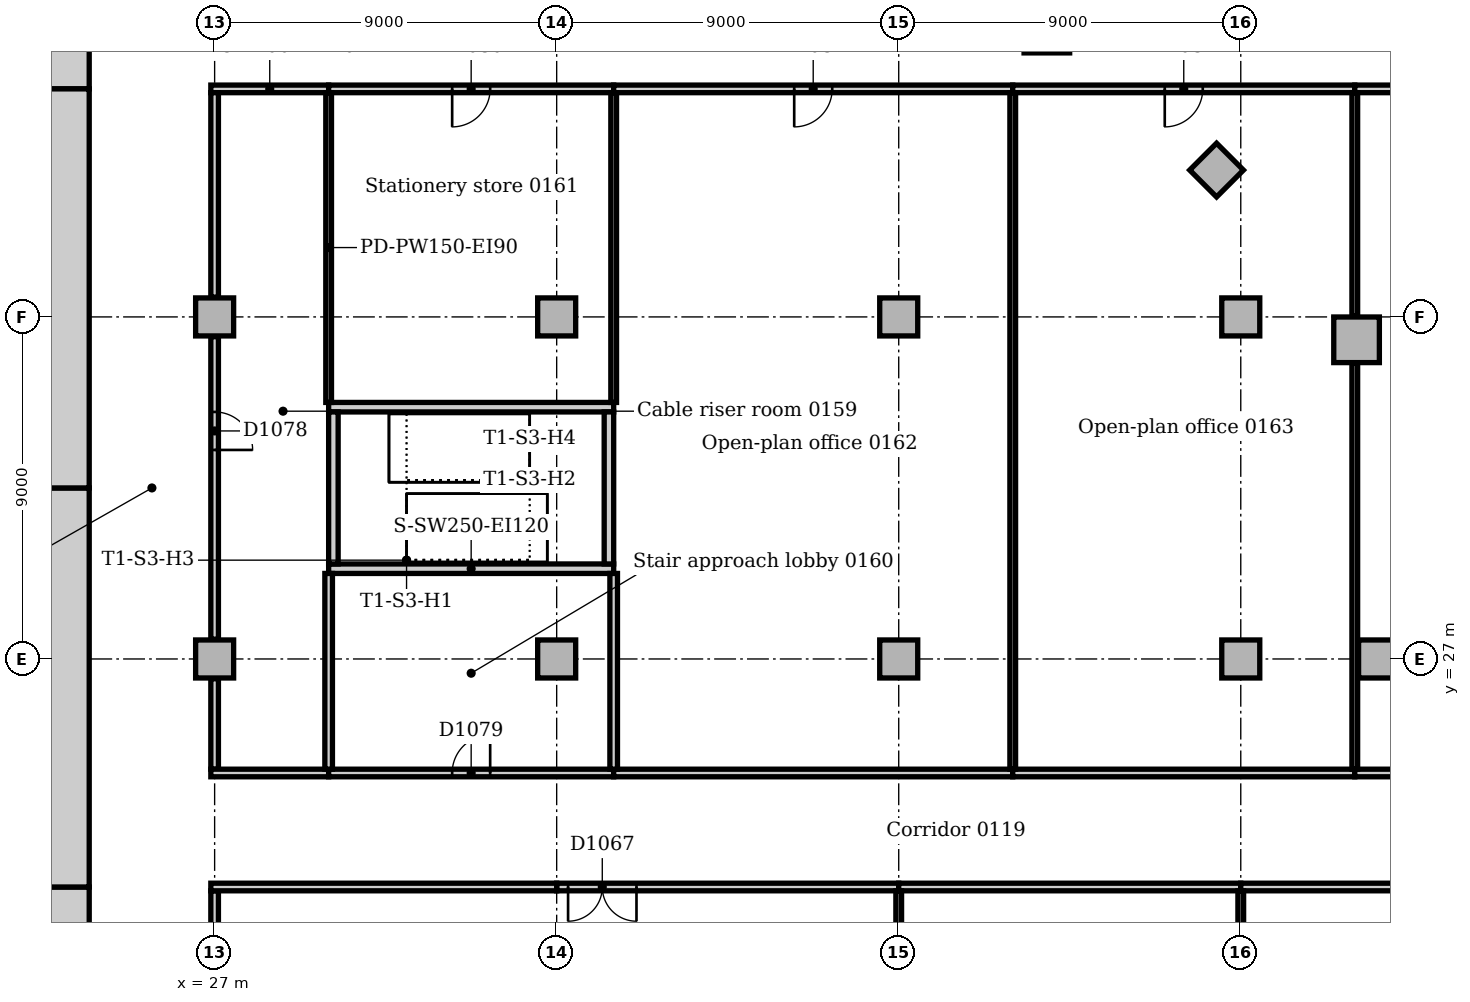
"""IFC4 building model, lengths in metres.
Left out: names, types, materials, properties, quantities, classifications, styles, units other than length and angle.
Written with IfcOpenShell. Run it as: python <this file> out.ifc"""

import sys

from ifc_helpers import new_model, si_unit, direction, frame, frame_2d, origin, origin_2d, place, context, subcontext, project, spatial, rectangle, extrude, element, fill, save


model = new_model("IFC4")
c1 = context("Model", 3, precision=1e-05, world=origin(), true_north=direction((0.0, 1.0)))
c2 = subcontext(c1, "Body", "Model", "MODEL_VIEW")
j1 = project(units=[si_unit("LENGTHUNIT", "METRE"), si_unit("PLANEANGLEUNIT", "RADIAN")], contexts=[c1])
p1 = place(None, origin())
s1 = spatial("IfcSite", under=j1, at=p1, CompositionType="ELEMENT")
p2 = place(p1, origin())
s2 = spatial("IfcBuilding", under=s1, at=p2, CompositionType="ELEMENT")
p3 = place(p2, frame((0.0, 0.0, 6.0)))
s3 = spatial("IfcBuildingStorey", under=s2, at=p3, CompositionType="ELEMENT", Elevation=6.0)
for number, where, z_axis, x_axis in (
    (1, (3.9, 20.4, 0.0), (0.0, 0.0, 1.0), (1.0, 0.0, 0.0)),
    (2, (23.7, 42.6, 0.0), (0.0, 0.0, 1.0), (-1.0, 0.0, 0.0)),
):
    element("IfcWall", number, at=place(p3, frame(where, z_axis=z_axis, x_axis=x_axis)), inside=s3, PredefinedType="SOLIDWALL", context=c2, shape_type="SweptSolid", body=[
        extrude(rectangle(XDim=19.8, YDim=1.2, at=frame_2d((9.9, 0.0))), origin(), (0.0, 0.0, 1.0), 5.0),
    ])
p4 = place(p3, frame((23.1, 21.0, 0.0), z_axis=(0.0, 0.0, 1.0), x_axis=(0.0, 1.0, 0.0)))
e3 = element("IfcWall", 3, at=p4, inside=s3, PredefinedType="SOLIDWALL", context=c2, shape_type="SweptSolid", body=[
    extrude(rectangle(XDim=10.5, YDim=1.2, at=frame_2d((5.25, 0.0))), origin(), (0.0, 0.0, 1.0), 5.0),
])
p5 = place(p4, frame((4.35, 0.0, 0.0)))
e4 = element("IfcOpeningElement", 4, at=p5, cuts=e3, PredefinedType="OPENING", context=c2, shape_type="SweptSolid", body=[
    extrude(rectangle(XDim=1.8, YDim=2.1, at=frame_2d((0.9, 1.05))), frame((0.0, 0.61, 0.0), z_axis=(0.0, -1.0, 0.0), x_axis=(1.0, 0.0, 0.0)), (0.0, 0.0, 1.0), 1.22),
])
p6 = place(p3, frame((23.1, 31.5, 0.0), z_axis=(0.0, 0.0, 1.0), x_axis=(0.0, 1.0, 0.0)))
e5 = element("IfcWall", 5, at=p6, inside=s3, PredefinedType="SOLIDWALL", context=c2, shape_type="SweptSolid", body=[
    extrude(rectangle(XDim=10.5, YDim=1.2, at=frame_2d((5.25, 0.0))), origin(), (0.0, 0.0, 1.0), 5.0),
])
p7 = place(p6, frame((3.15, 0.0, 0.0)))
e6 = element("IfcOpeningElement", 6, at=p7, cuts=e5, PredefinedType="OPENING", context=c2, shape_type="SweptSolid", body=[
    extrude(rectangle(XDim=1.0, YDim=2.1, at=frame_2d((0.5, 1.05))), frame((0.0, 0.61, 0.0), z_axis=(0.0, -1.0, 0.0), x_axis=(1.0, 0.0, 0.0)), (0.0, 0.0, 1.0), 1.22),
])
p8 = place(p6, frame((5.2, 0.0, 0.0)))
e7 = element("IfcOpeningElement", 7, at=p8, cuts=e5, PredefinedType="OPENING", context=c2, shape_type="SweptSolid", body=[
    extrude(rectangle(XDim=1.0, YDim=2.1, at=frame_2d((0.5, 1.05))), frame((0.0, 0.61, 0.0), z_axis=(0.0, -1.0, 0.0), x_axis=(1.0, 0.0, 0.0)), (0.0, 0.0, 1.0), 1.22),
])
for number, where, z_axis, x_axis in (
    (8, (30.0, 29.375, 0.0), (0.0, 0.0, 1.0), (1.0, 0.0, 0.0)),
    (9, (37.5, 33.625, 0.0), (0.0, 0.0, 1.0), (-1.0, 0.0, 0.0)),
):
    element("IfcWall", number, at=place(p3, frame(where, z_axis=z_axis, x_axis=x_axis)), inside=s3, PredefinedType="SOLIDWALL", context=c2, shape_type="SweptSolid", body=[
        extrude(rectangle(XDim=7.5, YDim=0.25, at=frame_2d((3.75, 0.0))), origin(), (0.0, 0.0, 1.0), 5.0),
    ])
for number, where, z_axis, x_axis in (
    (10, (37.375, 29.5, 0.0), (0.0, 0.0, 1.0), (0.0, 1.0, 0.0)),
    (11, (30.125, 33.5, 0.0), (0.0, 0.0, 1.0), (0.0, -1.0, 0.0)),
):
    element("IfcWall", number, at=place(p3, frame(where, z_axis=z_axis, x_axis=x_axis)), inside=s3, PredefinedType="SOLIDWALL", context=c2, shape_type="SweptSolid", body=[
        extrude(rectangle(XDim=4.0, YDim=0.25, at=frame_2d((2.0, 0.0))), origin(), (0.0, 0.0, 1.0), 5.0),
    ])
for number, where, z_axis, x_axis in (
    (12, (57.047, 35.398, 0.0), (0.0, 0.0, 1.0), (1.0, 0.0, 0.0)),
    (13, (48.898, 43.547, 0.0), (0.0, 0.0, 1.0), (1.0, 0.0, 0.0)),
):
    element("IfcColumn", number, at=place(p3, frame(where, z_axis=z_axis, x_axis=x_axis)), inside=s3, PredefinedType="COLUMN", context=c2, shape_type="SweptSolid", body=[
        extrude(rectangle(XDim=1.2, YDim=1.2, at=origin_2d()), origin(), (0.0, 0.0, 1.0), 4.7),
    ])
for number, where, z_axis, x_axis in (
    (14, (57.6, 27.0, 0.0), (0.0, 0.0, 1.0), (1.0, 0.0, 0.0)),
    (15, (53.364, 39.864, 0.0), (0.0, 0.0, 1.0), (0.707, 0.707, 0.0)),
    (16, (27.0, 27.0, 0.0), (0.0, 0.0, 1.0), (1.0, 0.0, 0.0)),
    (17, (27.0, 36.0, 0.0), (0.0, 0.0, 1.0), (1.0, 0.0, 0.0)),
    (18, (36.0, 27.0, 0.0), (0.0, 0.0, 1.0), (1.0, 0.0, 0.0)),
    (19, (36.0, 36.0, 0.0), (0.0, 0.0, 1.0), (1.0, 0.0, 0.0)),
    (20, (45.0, 27.0, 0.0), (0.0, 0.0, 1.0), (1.0, 0.0, 0.0)),
    (21, (45.0, 36.0, 0.0), (0.0, 0.0, 1.0), (1.0, 0.0, 0.0)),
    (22, (54.0, 27.0, 0.0), (0.0, 0.0, 1.0), (1.0, 0.0, 0.0)),
    (23, (54.0, 36.0, 0.0), (0.0, 0.0, 1.0), (1.0, 0.0, 0.0)),
):
    element("IfcColumn", number, at=place(p3, frame(where, z_axis=z_axis, x_axis=x_axis)), inside=s3, PredefinedType="COLUMN", context=c2, shape_type="SweptSolid", body=[
        extrude(rectangle(XDim=1.0, YDim=1.0, at=origin_2d()), origin(), (0.0, 0.0, 1.0), 4.7),
    ])
p9 = place(p3, frame((26.9, 42.0, 0.0), z_axis=(0.0, 0.0, 1.0), x_axis=(1.0, 0.0, 0.0)))
e24 = element("IfcWall", 24, at=p9, inside=s3, PredefinedType="PARTITIONING", context=c2, shape_type="SweptSolid", body=[
    extrude(rectangle(XDim=3.1, YDim=0.2, at=frame_2d((1.55, 0.0))), origin(), (0.0, 0.0, 1.0), 4.7),
])
p10 = place(p3, frame((30.0, 42.0, 0.0), z_axis=(0.0, 0.0, 1.0), x_axis=(1.0, 0.0, 0.0)))
e25 = element("IfcWall", 25, at=p10, inside=s3, PredefinedType="PARTITIONING", context=c2, shape_type="SweptSolid", body=[
    extrude(rectangle(XDim=7.5, YDim=0.2, at=frame_2d((3.75, 0.0))), origin(), (0.0, 0.0, 1.0), 4.7),
])
p11 = place(p10, frame((3.25, 0.0, 0.0)))
e26 = element("IfcOpeningElement", 26, at=p11, cuts=e25, PredefinedType="OPENING", context=c2, shape_type="SweptSolid", body=[
    extrude(rectangle(XDim=1.0, YDim=2.1, at=frame_2d((0.5, 1.05))), frame((0.0, 0.11, 0.0), z_axis=(0.0, -1.0, 0.0), x_axis=(1.0, 0.0, 0.0)), (0.0, 0.0, 1.0), 0.22),
])
p12 = place(p3, frame((37.5, 42.0, 0.0), z_axis=(0.0, 0.0, 1.0), x_axis=(1.0, 0.0, 0.0)))
e27 = element("IfcWall", 27, at=p12, inside=s3, PredefinedType="PARTITIONING", context=c2, shape_type="SweptSolid", body=[
    extrude(rectangle(XDim=10.5, YDim=0.2, at=frame_2d((5.25, 0.0))), origin(), (0.0, 0.0, 1.0), 4.7),
])
p13 = place(p12, frame((4.75, 0.0, 0.0)))
e28 = element("IfcOpeningElement", 28, at=p13, cuts=e27, PredefinedType="OPENING", context=c2, shape_type="SweptSolid", body=[
    extrude(rectangle(XDim=1.0, YDim=2.1, at=frame_2d((0.5, 1.05))), frame((0.0, 0.11, 0.0), z_axis=(0.0, -1.0, 0.0), x_axis=(1.0, 0.0, 0.0)), (0.0, 0.0, 1.0), 0.22),
])
p14 = place(p3, frame((48.0, 42.0, 0.0), z_axis=(0.0, 0.0, 1.0), x_axis=(1.0, 0.0, 0.0)))
e29 = element("IfcWall", 29, at=p14, inside=s3, PredefinedType="PARTITIONING", context=c2, shape_type="SweptSolid", body=[
    extrude(rectangle(XDim=9.0, YDim=0.2, at=frame_2d((4.5, 0.0))), origin(), (0.0, 0.0, 1.0), 4.7),
])
p15 = place(p14, frame((4.0, 0.0, 0.0)))
e30 = element("IfcOpeningElement", 30, at=p15, cuts=e29, PredefinedType="OPENING", context=c2, shape_type="SweptSolid", body=[
    extrude(rectangle(XDim=1.0, YDim=2.1, at=frame_2d((0.5, 1.05))), frame((0.0, 0.11, 0.0), z_axis=(0.0, -1.0, 0.0), x_axis=(1.0, 0.0, 0.0)), (0.0, 0.0, 1.0), 0.22),
])
p16 = place(p3, frame((57.0, 42.0, 0.0), z_axis=(0.0, 0.0, 1.0), x_axis=(1.0, 0.0, 0.0)))
e31 = element("IfcWall", 31, at=p16, inside=s3, PredefinedType="PARTITIONING", context=c2, shape_type="SweptSolid", body=[
    extrude(rectangle(XDim=8.6, YDim=0.2, at=frame_2d((4.3, 0.0))), origin(), (0.0, 0.0, 1.0), 4.7),
])
p17 = place(p16, frame((4.0, 0.0, 0.0)))
e32 = element("IfcOpeningElement", 32, at=p17, cuts=e31, PredefinedType="OPENING", context=c2, shape_type="SweptSolid", body=[
    extrude(rectangle(XDim=1.0, YDim=2.1, at=frame_2d((0.5, 1.05))), frame((0.0, 0.11, 0.0), z_axis=(0.0, -1.0, 0.0), x_axis=(1.0, 0.0, 0.0)), (0.0, 0.0, 1.0), 0.22),
])
for number, where, z_axis, x_axis in (
    (33, (27.0, 18.52, 0.0), (0.0, 0.0, 1.0), (0.0, 1.0, 0.0)),
    (34, (27.0, 24.1, 0.0), (0.0, 0.0, 1.0), (0.0, 1.0, 0.0)),
):
    element("IfcWall", number, at=place(p3, frame(where, z_axis=z_axis, x_axis=x_axis)), inside=s3, PredefinedType="PARTITIONING", context=c2, shape_type="SweptSolid", body=[
        extrude(rectangle(XDim=2.38, YDim=0.2, at=frame_2d((1.19, 0.0))), origin(), (0.0, 0.0, 1.0), 4.7),
    ])
p18 = place(p3, frame((27.0, 27.52, 0.0), z_axis=(0.0, 0.0, 1.0), x_axis=(0.0, 1.0, 0.0)))
e35 = element("IfcWall", 35, at=p18, inside=s3, PredefinedType="PARTITIONING", context=c2, shape_type="SweptSolid", body=[
    extrude(rectangle(XDim=7.96, YDim=0.2, at=frame_2d((3.98, 0.0))), origin(), (0.0, 0.0, 1.0), 4.7),
])
p19 = place(p18, frame((4.98, 0.0, 0.0)))
e36 = element("IfcOpeningElement", 36, at=p19, cuts=e35, PredefinedType="OPENING", context=c2, shape_type="SweptSolid", body=[
    extrude(rectangle(XDim=1.0, YDim=2.1, at=frame_2d((0.5, 1.05))), frame((0.0, 0.11, 0.0), z_axis=(0.0, -1.0, 0.0), x_axis=(1.0, 0.0, 0.0)), (0.0, 0.0, 1.0), 0.22),
])
p20 = place(p3, frame((27.0, 36.52, 0.0), z_axis=(0.0, 0.0, 1.0), x_axis=(0.0, 1.0, 0.0)))
e37 = element("IfcWall", 37, at=p20, inside=s3, PredefinedType="PARTITIONING", context=c2, shape_type="SweptSolid", body=[
    extrude(rectangle(XDim=5.38, YDim=0.2, at=frame_2d((2.69, 0.0))), origin(), (0.0, 0.0, 1.0), 4.7),
])
p21 = place(p3, frame((36.0, 21.0, 0.0), z_axis=(0.0, 0.0, 1.0), x_axis=(1.0, 0.0, 0.0)))
e38 = element("IfcWall", 38, at=p21, inside=s3, PredefinedType="PARTITIONING", context=c2, shape_type="SweptSolid", body=[
    extrude(rectangle(XDim=9.0, YDim=0.2, at=frame_2d((4.5, 0.0))), origin(), (0.0, 0.0, 1.0), 4.7),
])
p22 = place(p21, frame((0.3, 0.0, 0.0)))
e39 = element("IfcOpeningElement", 39, at=p22, cuts=e38, PredefinedType="OPENING", context=c2, shape_type="SweptSolid", body=[
    extrude(rectangle(XDim=1.8, YDim=2.1, at=frame_2d((0.9, 1.05))), frame((0.0, 0.11, 0.0), z_axis=(0.0, -1.0, 0.0), x_axis=(1.0, 0.0, 0.0)), (0.0, 0.0, 1.0), 0.22),
])
p23 = place(p3, frame((26.9, 21.0, 0.0), z_axis=(0.0, 0.0, 1.0), x_axis=(1.0, 0.0, 0.0)))
e40 = element("IfcWall", 40, at=p23, inside=s3, PredefinedType="PARTITIONING", context=c2, shape_type="SweptSolid", body=[
    extrude(rectangle(XDim=9.1, YDim=0.2, at=frame_2d((4.55, 0.0))), origin(), (0.0, 0.0, 1.0), 4.7),
])
p24 = place(p3, frame((45.0, 21.0, 0.0), z_axis=(0.0, 0.0, 1.0), x_axis=(1.0, 0.0, 0.0)))
e41 = element("IfcWall", 41, at=p24, inside=s3, PredefinedType="PARTITIONING", context=c2, shape_type="SweptSolid", body=[
    extrude(rectangle(XDim=9.0, YDim=0.2, at=frame_2d((4.5, 0.0))), origin(), (0.0, 0.0, 1.0), 4.7),
])
p25 = place(p3, frame((54.0, 21.0, 0.0), z_axis=(0.0, 0.0, 1.0), x_axis=(1.0, 0.0, 0.0)))
e42 = element("IfcWall", 42, at=p25, inside=s3, PredefinedType="PARTITIONING", context=c2, shape_type="SweptSolid", body=[
    extrude(rectangle(XDim=11.6, YDim=0.2, at=frame_2d((5.8, 0.0))), origin(), (0.0, 0.0, 1.0), 4.7),
])
p26 = place(p3, frame((26.9, 24.0, 0.0), z_axis=(0.0, 0.0, 1.0), x_axis=(1.0, 0.0, 0.0)))
e43 = element("IfcWall", 43, at=p26, inside=s3, PredefinedType="PARTITIONING", context=c2, shape_type="SweptSolid", body=[
    extrude(rectangle(XDim=3.1, YDim=0.2, at=frame_2d((1.55, 0.0))), origin(), (0.0, 0.0, 1.0), 4.7),
])
p27 = place(p3, frame((30.0, 24.0, 0.0), z_axis=(0.0, 0.0, 1.0), x_axis=(1.0, 0.0, 0.0)))
e44 = element("IfcWall", 44, at=p27, inside=s3, PredefinedType="PARTITIONING", context=c2, shape_type="SweptSolid", body=[
    extrude(rectangle(XDim=7.5, YDim=0.2, at=frame_2d((3.75, 0.0))), origin(), (0.0, 0.0, 1.0), 4.7),
])
p28 = place(p27, frame((3.25, 0.0, 0.0)))
e45 = element("IfcOpeningElement", 45, at=p28, cuts=e44, PredefinedType="OPENING", context=c2, shape_type="SweptSolid", body=[
    extrude(rectangle(XDim=1.0, YDim=2.1, at=frame_2d((0.5, 1.05))), frame((0.0, 0.11, 0.0), z_axis=(0.0, -1.0, 0.0), x_axis=(1.0, 0.0, 0.0)), (0.0, 0.0, 1.0), 0.22),
])
p29 = place(p3, frame((37.5, 24.0, 0.0), z_axis=(0.0, 0.0, 1.0), x_axis=(1.0, 0.0, 0.0)))
e46 = element("IfcWall", 46, at=p29, inside=s3, PredefinedType="PARTITIONING", context=c2, shape_type="SweptSolid", body=[
    extrude(rectangle(XDim=10.5, YDim=0.2, at=frame_2d((5.25, 0.0))), origin(), (0.0, 0.0, 1.0), 4.7),
])
p30 = place(p3, frame((48.0, 24.0, 0.0), z_axis=(0.0, 0.0, 1.0), x_axis=(1.0, 0.0, 0.0)))
e47 = element("IfcWall", 47, at=p30, inside=s3, PredefinedType="PARTITIONING", context=c2, shape_type="SweptSolid", body=[
    extrude(rectangle(XDim=9.0, YDim=0.2, at=frame_2d((4.5, 0.0))), origin(), (0.0, 0.0, 1.0), 4.7),
])
p31 = place(p3, frame((57.0, 24.0, 0.0), z_axis=(0.0, 0.0, 1.0), x_axis=(1.0, 0.0, 0.0)))
e48 = element("IfcWall", 48, at=p31, inside=s3, PredefinedType="PARTITIONING", context=c2, shape_type="SweptSolid", body=[
    extrude(rectangle(XDim=8.6, YDim=0.2, at=frame_2d((4.3, 0.0))), origin(), (0.0, 0.0, 1.0), 4.7),
])
for number, where, z_axis, x_axis in (
    (49, (45.0, 18.52, 0.0), (0.0, 0.0, 1.0), (0.0, 1.0, 0.0)),
    (50, (54.0, 18.52, 0.0), (0.0, 0.0, 1.0), (0.0, 1.0, 0.0)),
):
    element("IfcWall", number, at=place(p3, frame(where, z_axis=z_axis, x_axis=x_axis)), inside=s3, PredefinedType="PARTITIONING", context=c2, shape_type="SweptSolid", body=[
        extrude(rectangle(XDim=2.38, YDim=0.15, at=frame_2d((1.19, 0.0))), origin(), (0.0, 0.0, 1.0), 4.7),
    ])
p32 = place(p3, frame((30.0, 24.1, 0.0), z_axis=(0.0, 0.0, 1.0), x_axis=(0.0, 1.0, 0.0)))
e51 = element("IfcWall", 51, at=p32, inside=s3, PredefinedType="PARTITIONING", context=c2, shape_type="SweptSolid", body=[
    extrude(rectangle(XDim=5.15, YDim=0.2, at=frame_2d((2.575, 0.0))), origin(), (0.0, 0.0, 1.0), 4.7),
])
p33 = place(p3, frame((30.0, 33.75, 0.0), z_axis=(0.0, 0.0, 1.0), x_axis=(0.0, 1.0, 0.0)))
e52 = element("IfcWall", 52, at=p33, inside=s3, PredefinedType="PARTITIONING", context=c2, shape_type="SweptSolid", body=[
    extrude(rectangle(XDim=8.15, YDim=0.15, at=frame_2d((4.075, 0.0))), origin(), (0.0, 0.0, 1.0), 4.7),
])
p34 = place(p3, frame((37.5, 24.1, 0.0), z_axis=(0.0, 0.0, 1.0), x_axis=(0.0, 1.0, 0.0)))
e53 = element("IfcWall", 53, at=p34, inside=s3, PredefinedType="PARTITIONING", context=c2, shape_type="SweptSolid", body=[
    extrude(rectangle(XDim=5.15, YDim=0.2, at=frame_2d((2.575, 0.0))), origin(), (0.0, 0.0, 1.0), 4.7),
])
p35 = place(p3, frame((37.5, 33.75, 0.0), z_axis=(0.0, 0.0, 1.0), x_axis=(0.0, 1.0, 0.0)))
e54 = element("IfcWall", 54, at=p35, inside=s3, PredefinedType="PARTITIONING", context=c2, shape_type="SweptSolid", body=[
    extrude(rectangle(XDim=8.15, YDim=0.15, at=frame_2d((4.075, 0.0))), origin(), (0.0, 0.0, 1.0), 4.7),
])
p36 = place(p3, frame((48.0, 24.1, 0.0), z_axis=(0.0, 0.0, 1.0), x_axis=(0.0, 1.0, 0.0)))
e55 = element("IfcWall", 55, at=p36, inside=s3, PredefinedType="PARTITIONING", context=c2, shape_type="SweptSolid", body=[
    extrude(rectangle(XDim=17.8, YDim=0.15, at=frame_2d((8.9, 0.0))), origin(), (0.0, 0.0, 1.0), 4.7),
])
p37 = place(p3, frame((57.0, 24.1, 0.0), z_axis=(0.0, 0.0, 1.0), x_axis=(0.0, 1.0, 0.0)))
e56 = element("IfcWall", 56, at=p37, inside=s3, PredefinedType="PARTITIONING", context=c2, shape_type="SweptSolid", body=[
    extrude(rectangle(XDim=10.678, YDim=0.15, at=frame_2d((5.339, 0.0))), origin(), (0.0, 0.0, 1.0), 4.7),
])
p38 = place(p3, frame((57.0, 36.018, 0.0), z_axis=(0.0, 0.0, 1.0), x_axis=(0.0, 1.0, 0.0)))
e57 = element("IfcWall", 57, at=p38, inside=s3, PredefinedType="PARTITIONING", context=c2, shape_type="SweptSolid", body=[
    extrude(rectangle(XDim=5.882, YDim=0.15, at=frame_2d((2.941, 0.0))), origin(), (0.0, 0.0, 1.0), 4.7),
])
p39 = place(p22, frame((1.8, 0.0, 0.0), z_axis=(0.0, 0.0, 1.0), x_axis=(-1.0, 0.0, 0.0)))
e58 = element("IfcDoor", 58, at=p39, inside=s3, OperationType="DOUBLE_DOOR_SINGLE_SWING", PredefinedType="DOOR", context=c2, shape_type="SweptSolid", body=[
    extrude(rectangle(XDim=1.8, YDim=2.1, at=frame_2d((0.9, 1.05))), frame((0.0, 0.025, 0.0), z_axis=(0.0, -1.0, 0.0), x_axis=(1.0, 0.0, 0.0)), (0.0, 0.0, 1.0), 0.05),
])
fill(e39, e58)
p40 = place(p19, frame((1.0, 0.0, 0.0), z_axis=(0.0, 0.0, 1.0), x_axis=(-1.0, 0.0, 0.0)))
e59 = element("IfcDoor", 59, at=p40, inside=s3, OperationType="SINGLE_SWING_RIGHT", PredefinedType="DOOR", context=c2, shape_type="SweptSolid", body=[
    extrude(rectangle(XDim=1.0, YDim=2.1, at=frame_2d((0.5, 1.05))), frame((0.0, 0.025, 0.0), z_axis=(0.0, -1.0, 0.0), x_axis=(1.0, 0.0, 0.0)), (0.0, 0.0, 1.0), 0.05),
])
fill(e36, e59)
p41 = place(p28, origin())
e60 = element("IfcDoor", 60, at=p41, inside=s3, OperationType="SINGLE_SWING_RIGHT", PredefinedType="DOOR", context=c2, shape_type="SweptSolid", body=[
    extrude(rectangle(XDim=1.0, YDim=2.1, at=frame_2d((0.5, 1.05))), frame((0.0, 0.025, 0.0), z_axis=(0.0, -1.0, 0.0), x_axis=(1.0, 0.0, 0.0)), (0.0, 0.0, 1.0), 0.05),
])
fill(e45, e60)
p42 = place(p11, frame((1.0, 0.0, 0.0), z_axis=(0.0, 0.0, 1.0), x_axis=(-1.0, 0.0, 0.0)))
e61 = element("IfcDoor", 61, at=p42, inside=s3, OperationType="SINGLE_SWING_RIGHT", PredefinedType="DOOR", context=c2, shape_type="SweptSolid", body=[
    extrude(rectangle(XDim=1.0, YDim=2.1, at=frame_2d((0.5, 1.05))), frame((0.0, 0.025, 0.0), z_axis=(0.0, -1.0, 0.0), x_axis=(1.0, 0.0, 0.0)), (0.0, 0.0, 1.0), 0.05),
])
fill(e26, e61)
p43 = place(p13, frame((1.0, 0.0, 0.0), z_axis=(0.0, 0.0, 1.0), x_axis=(-1.0, 0.0, 0.0)))
e62 = element("IfcDoor", 62, at=p43, inside=s3, OperationType="SINGLE_SWING_RIGHT", PredefinedType="DOOR", context=c2, shape_type="SweptSolid", body=[
    extrude(rectangle(XDim=1.0, YDim=2.1, at=frame_2d((0.5, 1.05))), frame((0.0, 0.025, 0.0), z_axis=(0.0, -1.0, 0.0), x_axis=(1.0, 0.0, 0.0)), (0.0, 0.0, 1.0), 0.05),
])
fill(e28, e62)
p44 = place(p15, frame((1.0, 0.0, 0.0), z_axis=(0.0, 0.0, 1.0), x_axis=(-1.0, 0.0, 0.0)))
e63 = element("IfcDoor", 63, at=p44, inside=s3, OperationType="SINGLE_SWING_RIGHT", PredefinedType="DOOR", context=c2, shape_type="SweptSolid", body=[
    extrude(rectangle(XDim=1.0, YDim=2.1, at=frame_2d((0.5, 1.05))), frame((0.0, 0.025, 0.0), z_axis=(0.0, -1.0, 0.0), x_axis=(1.0, 0.0, 0.0)), (0.0, 0.0, 1.0), 0.05),
])
fill(e30, e63)
p45 = place(p5, origin())
e64 = element("IfcDoor", 64, at=p45, inside=s3, OperationType="DOUBLE_DOOR_DOUBLE_SWING", PredefinedType="DOOR", context=c2, shape_type="SweptSolid", body=[
    extrude(rectangle(XDim=1.8, YDim=2.1, at=frame_2d((0.9, 1.05))), frame((0.0, 0.025, 0.0), z_axis=(0.0, -1.0, 0.0), x_axis=(1.0, 0.0, 0.0)), (0.0, 0.0, 1.0), 0.05),
])
fill(e4, e64)
p46 = place(p7, frame((1.0, 0.0, 0.0), z_axis=(0.0, 0.0, 1.0), x_axis=(-1.0, 0.0, 0.0)))
e65 = element("IfcDoor", 65, at=p46, inside=s3, OperationType="SINGLE_SWING_RIGHT", PredefinedType="DOOR", context=c2, shape_type="SweptSolid", body=[
    extrude(rectangle(XDim=1.0, YDim=2.1, at=frame_2d((0.5, 1.05))), frame((0.0, 0.025, 0.0), z_axis=(0.0, -1.0, 0.0), x_axis=(1.0, 0.0, 0.0)), (0.0, 0.0, 1.0), 0.05),
])
fill(e6, e65)
p47 = place(p8, frame((1.0, 0.0, 0.0), z_axis=(0.0, 0.0, 1.0), x_axis=(-1.0, 0.0, 0.0)))
e66 = element("IfcDoor", 66, at=p47, inside=s3, OperationType="SINGLE_SWING_LEFT", PredefinedType="DOOR", context=c2, shape_type="SweptSolid", body=[
    extrude(rectangle(XDim=1.0, YDim=2.1, at=frame_2d((0.5, 1.05))), frame((0.0, 0.025, 0.0), z_axis=(0.0, -1.0, 0.0), x_axis=(1.0, 0.0, 0.0)), (0.0, 0.0, 1.0), 0.05),
])
fill(e7, e66)
save(model, sys.argv[1])
